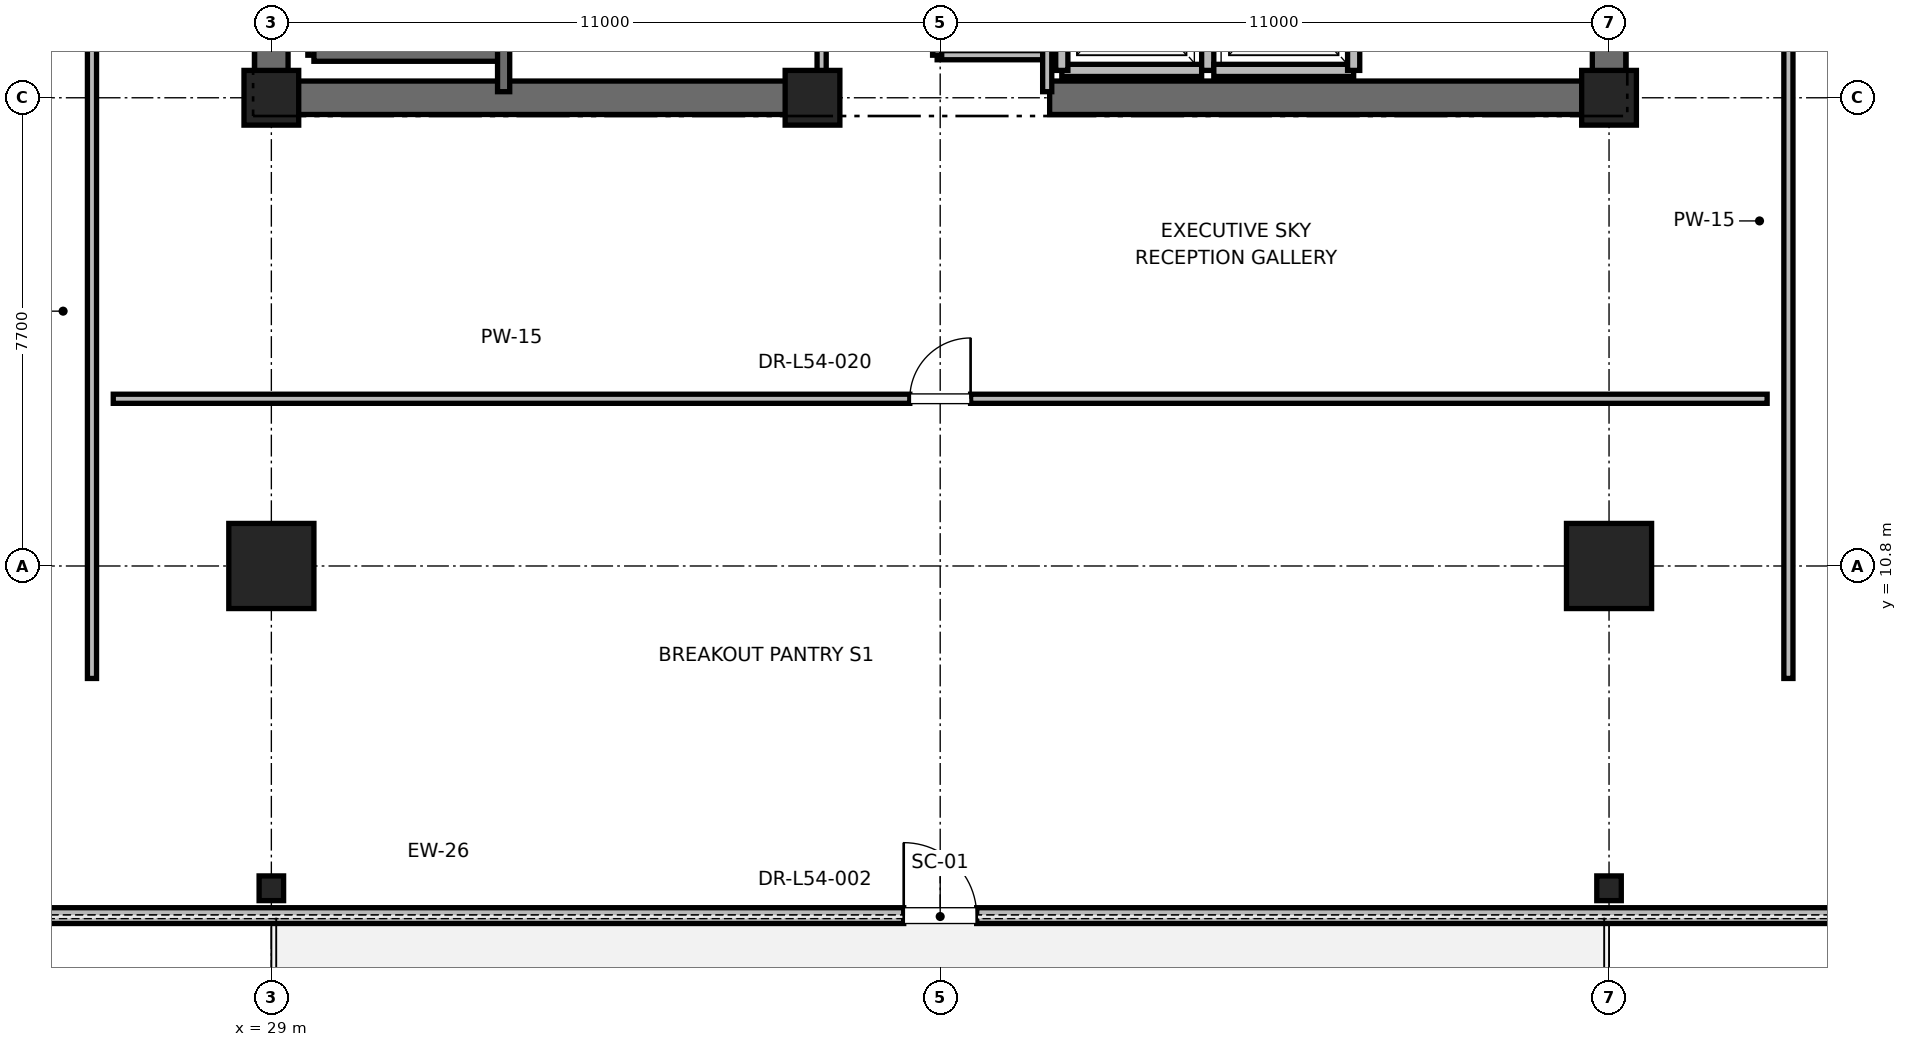
"""IFC4 building model, lengths in metres.
Left out: names, types, materials, properties, quantities, classifications, styles, units other than length and angle.
Written with IfcOpenShell. Run it as: python <this file> out.ifc"""

import sys

from ifc_helpers import new_model, si_unit, direction, frame, frame_2d, origin, origin_2d, place, context, subcontext, project, spatial, rectangle, i_section, extrude, element, fill, save


model = new_model("IFC4")
c1 = context("Model", 3, precision=1e-05, world=origin(), true_north=direction((0.0, 1.0)))
c2 = subcontext(c1, "Body", "Model", "MODEL_VIEW")
j1 = project(units=[si_unit("LENGTHUNIT", "METRE"), si_unit("PLANEANGLEUNIT", "RADIAN")], contexts=[c1])
p1 = place(None, origin())
s1 = spatial("IfcSite", under=j1, at=p1, CompositionType="ELEMENT")
p2 = place(p1, origin())
s2 = spatial("IfcBuilding", under=s1, at=p2, CompositionType="ELEMENT")
p3 = place(p2, frame((0.0, 0.0, 233.2)))
s3 = spatial("IfcBuildingStorey", under=s2, at=p3, CompositionType="ELEMENT", Elevation=233.2)
for number, where, z_axis, x_axis in (
    (1, (29.0, 10.8, 0.0), (0.0, 0.0, 1.0), (1.0, 0.0, 0.0)),
    (2, (51.0, 10.8, 0.0), (0.0, 0.0, 1.0), (1.0, 0.0, 0.0)),
):
    element("IfcColumn", number, at=place(p3, frame(where, z_axis=z_axis, x_axis=x_axis)), inside=s3, PredefinedType="COLUMN", context=c2, shape_type="SweptSolid", body=[
        extrude(rectangle(XDim=1.4, YDim=1.4, at=origin_2d()), origin(), (0.0, 0.0, 1.0), 5.0),
    ])
for number, where, z_axis, x_axis in (
    (3, (29.0, 5.5, 0.0), (0.0, 0.0, 1.0), (1.0, 0.0, 0.0)),
    (4, (51.0, 5.5, 0.0), (0.0, 0.0, 1.0), (1.0, 0.0, 0.0)),
):
    element("IfcColumn", number, at=place(p3, frame(where, z_axis=z_axis, x_axis=x_axis)), inside=s3, PredefinedType="COLUMN", context=c2, shape_type="SweptSolid", body=[
        extrude(i_section(OverallWidth=0.403, OverallDepth=0.406, WebThickness=0.027, FlangeThickness=0.043, FilletRadius=0.015, at=origin_2d()), origin(), (0.0, 0.0, 1.0), 5.0),
    ])
for number, where, z_axis, x_axis in (
    (5, (29.0, 18.5, 0.0), (0.0, 0.0, 1.0), (1.0, 0.0, 0.0)),
    (6, (51.0, 18.5, 0.0), (0.0, 0.0, 1.0), (1.0, 0.0, 0.0)),
    (7, (37.9, 18.5, 0.0), (0.0, 0.0, 1.0), (1.0, 0.0, 0.0)),
):
    element("IfcColumn", number, at=place(p3, frame(where, z_axis=z_axis, x_axis=x_axis)), inside=s3, PredefinedType="PILASTER", context=c2, shape_type="SweptSolid", body=[
        extrude(rectangle(XDim=0.9, YDim=0.9, at=origin_2d()), origin(), (0.0, 0.0, 1.0), 5.0),
    ])
for number, where, z_axis, x_axis in (
    (8, (29.0, 18.5, 0.0), (0.0, 0.0, 1.0), (1.0, 0.0, 0.0)),
    (9, (41.8, 18.5, 0.0), (0.0, 0.0, 1.0), (1.0, 0.0, 0.0)),
):
    element("IfcWall", number, at=place(p3, frame(where, z_axis=z_axis, x_axis=x_axis)), inside=s3, PredefinedType="SHEAR", context=c2, shape_type="SweptSolid", body=[
        extrude(rectangle(XDim=9.2, YDim=0.55, at=frame_2d((4.6, 0.0))), origin(), (0.0, 0.0, 1.0), 4.7),
    ])
p4 = place(p3, frame((29.0, 18.5, 0.0), z_axis=(0.0, 0.0, 1.0), x_axis=(0.0, 1.0, 0.0)))
e10 = element("IfcWall", 10, at=p4, inside=s3, PredefinedType="SHEAR", context=c2, shape_type="SweptSolid", body=[
    extrude(rectangle(XDim=8.8, YDim=0.55, at=frame_2d((4.4, 0.0))), origin(), (0.0, 0.0, 1.0), 4.7),
])
p5 = place(p3, frame((51.0, 18.5, 0.0), z_axis=(0.0, 0.0, 1.0), x_axis=(0.0, 1.0, 0.0)))
e11 = element("IfcWall", 11, at=p5, inside=s3, PredefinedType="SHEAR", context=c2, shape_type="SweptSolid", body=[
    extrude(rectangle(XDim=5.8, YDim=0.55, at=frame_2d((2.9, 0.0))), origin(), (0.0, 0.0, 1.0), 4.7),
])
p6 = place(p3, frame((17.893, 5.05, 0.0), z_axis=(0.0, 0.0, 1.0), x_axis=(1.0, 0.0, 0.0)))
e12 = element("IfcWall", 12, at=p6, inside=s3, PredefinedType="PARAPET", context=c2, shape_type="SweptSolid", body=[
    extrude(rectangle(XDim=44.214, YDim=0.26, at=frame_2d((22.107, 0.0))), origin(), (0.0, 0.0, 1.0), 3.987),
])
p7 = place(p6, frame((4.2, 0.0, 0.85)))
e13 = element("IfcOpeningElement", 13, at=p7, cuts=e12, PredefinedType="OPENING", context=c2, shape_type="SweptSolid", body=[
    extrude(rectangle(XDim=2.0, YDim=2.3, at=frame_2d((1.0, 1.15))), frame((0.0, 0.13, 0.0), z_axis=(0.0, -1.0, 0.0), x_axis=(1.0, 0.0, 0.0)), (0.0, 0.0, 1.0), 0.26),
])
p8 = place(p6, frame((21.507, 0.0, 0.0)))
e14 = element("IfcOpeningElement", 14, at=p8, cuts=e12, PredefinedType="OPENING", context=c2, shape_type="SweptSolid", body=[
    extrude(rectangle(XDim=1.2, YDim=2.2, at=frame_2d((0.6, 1.1))), frame((0.0, 0.13, 0.0), z_axis=(0.0, -1.0, 0.0), x_axis=(1.0, 0.0, 0.0)), (0.0, 0.0, 1.0), 0.26),
])
p9 = place(p6, frame((38.014, 0.0, 0.85)))
e15 = element("IfcOpeningElement", 15, at=p9, cuts=e12, PredefinedType="OPENING", context=c2, shape_type="SweptSolid", body=[
    extrude(rectangle(XDim=2.0, YDim=2.3, at=frame_2d((1.0, 1.15))), frame((0.0, 0.13, 0.0), z_axis=(0.0, -1.0, 0.0), x_axis=(1.0, 0.0, 0.0)), (0.0, 0.0, 1.0), 0.26),
])
p10 = place(p3, frame((29.7, 19.2, 0.0), z_axis=(0.0, 0.0, 1.0), x_axis=(0.0, 1.0, 0.0)))
e16 = element("IfcWall", 16, at=p10, inside=s3, PredefinedType="SOLIDWALL", context=c2, shape_type="SweptSolid", body=[
    extrude(rectangle(XDim=8.15, YDim=0.2, at=frame_2d((4.075, 0.0))), origin(), (0.0, 0.0, 1.0), 4.7),
])
p11 = place(p3, frame((29.7, 19.2, 0.0), z_axis=(0.0, 0.0, 1.0), x_axis=(1.0, 0.0, 0.0)))
e17 = element("IfcWall", 17, at=p11, inside=s3, PredefinedType="SOLIDWALL", context=c2, shape_type="SweptSolid", body=[
    extrude(rectangle(XDim=3.12, YDim=0.2, at=frame_2d((1.56, 0.0))), origin(), (0.0, 0.0, 1.0), 4.7),
])
p12 = place(p3, frame((32.82, 18.6, 0.0), z_axis=(0.0, 0.0, 1.0), x_axis=(0.0, 1.0, 0.0)))
e18 = element("IfcWall", 18, at=p12, inside=s3, PredefinedType="SOLIDWALL", context=c2, shape_type="SweptSolid", body=[
    extrude(rectangle(XDim=8.78, YDim=0.2, at=frame_2d((4.39, 0.0))), origin(), (0.0, 0.0, 1.0), 4.7),
])
p13 = place(p3, frame((42.0, 18.95, 0.0), z_axis=(0.0, 0.0, 1.0), x_axis=(1.0, 0.0, 0.0)))
e19 = element("IfcWall", 19, at=p13, inside=s3, PredefinedType="SOLIDWALL", context=c2, shape_type="SweptSolid", body=[
    extrude(rectangle(XDim=2.3, YDim=0.2, at=frame_2d((1.15, 0.0))), origin(), (0.0, 0.0, 1.0), 3.68),
])
p14 = place(p3, frame((42.0, 21.55, 0.0), z_axis=(0.0, 0.0, 1.0), x_axis=(0.0, -1.0, 0.0)))
e20 = element("IfcWall", 20, at=p14, inside=s3, PredefinedType="SOLIDWALL", context=c2, shape_type="SweptSolid", body=[
    extrude(rectangle(XDim=2.6, YDim=0.2, at=frame_2d((1.3, 0.0))), origin(), (0.0, 0.0, 1.0), 3.68),
])
p15 = place(p3, frame((44.4, 18.95, 0.0), z_axis=(0.0, 0.0, 1.0), x_axis=(0.0, 1.0, 0.0)))
e21 = element("IfcWall", 21, at=p15, inside=s3, PredefinedType="SOLIDWALL", context=c2, shape_type="SweptSolid", body=[
    extrude(rectangle(XDim=2.6, YDim=0.2, at=frame_2d((1.3, 0.0))), origin(), (0.0, 0.0, 1.0), 4.7),
])
p16 = place(p3, frame((44.5, 18.95, 0.0), z_axis=(0.0, 0.0, 1.0), x_axis=(1.0, 0.0, 0.0)))
e22 = element("IfcWall", 22, at=p16, inside=s3, PredefinedType="SOLIDWALL", context=c2, shape_type="SweptSolid", body=[
    extrude(rectangle(XDim=2.3, YDim=0.2, at=frame_2d((1.15, 0.0))), origin(), (0.0, 0.0, 1.0), 4.7),
])
p17 = place(p3, frame((46.8, 18.95, 0.0), z_axis=(0.0, 0.0, 1.0), x_axis=(0.0, 1.0, 0.0)))
e23 = element("IfcWall", 23, at=p17, inside=s3, PredefinedType="SOLIDWALL", context=c2, shape_type="SweptSolid", body=[
    extrude(rectangle(XDim=2.6, YDim=0.2, at=frame_2d((1.3, 0.0))), origin(), (0.0, 0.0, 1.0), 4.7),
])
p18 = place(p3, frame((39.95, 19.2, 0.0), z_axis=(0.0, 0.0, 1.0), x_axis=(1.0, 0.0, 0.0)))
e24 = element("IfcWall", 24, at=p18, inside=s3, PredefinedType="PARTITIONING", context=c2, shape_type="SweptSolid", body=[
    extrude(rectangle(XDim=1.81, YDim=0.15, at=frame_2d((0.905, 0.0))), origin(), (0.0, 0.0, 1.0), 2.85),
])
p19 = place(p3, frame((41.76, 18.6, 0.0), z_axis=(0.0, 0.0, 1.0), x_axis=(0.0, 1.0, 0.0)))
e25 = element("IfcWall", 25, at=p19, inside=s3, PredefinedType="PARTITIONING", context=c2, shape_type="SweptSolid", body=[
    extrude(rectangle(XDim=3.6, YDim=0.15, at=frame_2d((1.8, 0.0))), origin(), (0.0, 0.0, 1.0), 2.85),
])
p20 = place(p3, frame((39.95, 19.2, 0.0), z_axis=(0.0, 0.0, 1.0), x_axis=(0.0, 1.0, 0.0)))
e26 = element("IfcWall", 26, at=p20, inside=s3, PredefinedType="PARTITIONING", context=c2, shape_type="SweptSolid", body=[
    extrude(rectangle(XDim=3.0, YDim=0.15, at=frame_2d((1.5, 0.0))), origin(), (0.0, 0.0, 1.0), 2.85),
])
p21 = place(p20, frame((1.05, 0.0, 0.0)))
e27 = element("IfcOpeningElement", 27, at=p21, cuts=e26, PredefinedType="OPENING", context=c2, shape_type="SweptSolid", body=[
    extrude(rectangle(XDim=0.9, YDim=2.1, at=frame_2d((0.45, 1.05))), frame((0.0, 0.075, 0.0), z_axis=(0.0, -1.0, 0.0), x_axis=(1.0, 0.0, 0.0)), (0.0, 0.0, 1.0), 0.15),
])
p22 = place(p3, frame((38.05, 18.6, 0.0), z_axis=(0.0, 0.0, 1.0), x_axis=(0.0, 1.0, 0.0)))
e28 = element("IfcWall", 28, at=p22, inside=s3, PredefinedType="PARTITIONING", context=c2, shape_type="SweptSolid", body=[
    extrude(rectangle(XDim=3.06, YDim=0.15, at=frame_2d((1.53, 0.0))), origin(), (0.0, 0.0, 1.0), 2.85),
])
p23 = place(p22, frame((1.03, 0.0, 0.0)))
e29 = element("IfcOpeningElement", 29, at=p23, cuts=e28, PredefinedType="OPENING", context=c2, shape_type="SweptSolid", body=[
    extrude(rectangle(XDim=1.0, YDim=2.15, at=frame_2d((0.5, 1.075))), frame((0.0, 0.075, 0.0), z_axis=(0.0, -1.0, 0.0), x_axis=(1.0, 0.0, 0.0)), (0.0, 0.0, 1.0), 0.15),
])
p24 = place(p3, frame((26.4, 13.55, 0.0), z_axis=(0.0, 0.0, 1.0), x_axis=(1.0, 0.0, 0.0)))
e30 = element("IfcWall", 30, at=p24, inside=s3, PredefinedType="PARTITIONING", context=c2, shape_type="SweptSolid", body=[
    extrude(rectangle(XDim=27.2, YDim=0.15, at=frame_2d((13.6, 0.0))), origin(), (0.0, 0.0, 1.0), 2.85),
])
p25 = place(p24, frame((13.1, 0.0, 0.0)))
e31 = element("IfcOpeningElement", 31, at=p25, cuts=e30, PredefinedType="OPENING", context=c2, shape_type="SweptSolid", body=[
    extrude(rectangle(XDim=1.0, YDim=2.15, at=frame_2d((0.5, 1.075))), frame((0.0, 0.075, 0.0), z_axis=(0.0, -1.0, 0.0), x_axis=(1.0, 0.0, 0.0)), (0.0, 0.0, 1.0), 0.15),
])
p26 = place(p3, frame((26.05, 8.95, 0.0), z_axis=(0.0, 0.0, 1.0), x_axis=(0.0, 1.0, 0.0)))
e32 = element("IfcWall", 32, at=p26, inside=s3, PredefinedType="PARTITIONING", context=c2, shape_type="SweptSolid", body=[
    extrude(rectangle(XDim=15.582, YDim=0.15, at=frame_2d((7.791, 0.0))), origin(), (0.0, 0.0, 1.0), 2.85),
])
p27 = place(p26, frame((12.081, 0.0, 0.0)))
e33 = element("IfcOpeningElement", 33, at=p27, cuts=e32, PredefinedType="OPENING", context=c2, shape_type="SweptSolid", body=[
    extrude(rectangle(XDim=1.0, YDim=2.15, at=frame_2d((0.5, 1.075))), frame((0.0, 0.075, 0.0), z_axis=(0.0, -1.0, 0.0), x_axis=(1.0, 0.0, 0.0)), (0.0, 0.0, 1.0), 0.15),
])
p28 = place(p3, frame((53.95, 8.95, 0.0), z_axis=(0.0, 0.0, 1.0), x_axis=(0.0, 1.0, 0.0)))
e34 = element("IfcWall", 34, at=p28, inside=s3, PredefinedType="PARTITIONING", context=c2, shape_type="SweptSolid", body=[
    extrude(rectangle(XDim=21.518, YDim=0.15, at=frame_2d((10.759, 0.0))), origin(), (0.0, 0.0, 1.0), 2.85),
])
p29 = place(p28, frame((15.049, 0.0, 0.0)))
e35 = element("IfcOpeningElement", 35, at=p29, cuts=e34, PredefinedType="OPENING", context=c2, shape_type="SweptSolid", body=[
    extrude(rectangle(XDim=1.0, YDim=2.15, at=frame_2d((0.5, 1.075))), frame((0.0, 0.075, 0.0), z_axis=(0.0, -1.0, 0.0), x_axis=(1.0, 0.0, 0.0)), (0.0, 0.0, 1.0), 0.15),
])
p30 = place(p8, origin())
e36 = element("IfcDoor", 36, at=p30, inside=s3, OperationType="SINGLE_SWING_LEFT", PredefinedType="DOOR", context=c2, shape_type="SweptSolid", body=[
    extrude(rectangle(XDim=1.2, YDim=2.2, at=frame_2d((0.6, 1.1))), frame((0.0, 0.025, 0.0), z_axis=(0.0, -1.0, 0.0), x_axis=(1.0, 0.0, 0.0)), (0.0, 0.0, 1.0), 0.05),
])
fill(e14, e36)
p31 = place(p25, origin())
e37 = element("IfcDoor", 37, at=p31, inside=s3, OperationType="SINGLE_SWING_RIGHT", PredefinedType="DOOR", context=c2, shape_type="SweptSolid", body=[
    extrude(rectangle(XDim=1.0, YDim=2.15, at=frame_2d((0.5, 1.075))), frame((0.0, 0.025, 0.0), z_axis=(0.0, -1.0, 0.0), x_axis=(1.0, 0.0, 0.0)), (0.0, 0.0, 1.0), 0.05),
])
fill(e31, e37)
save(model, sys.argv[1])
